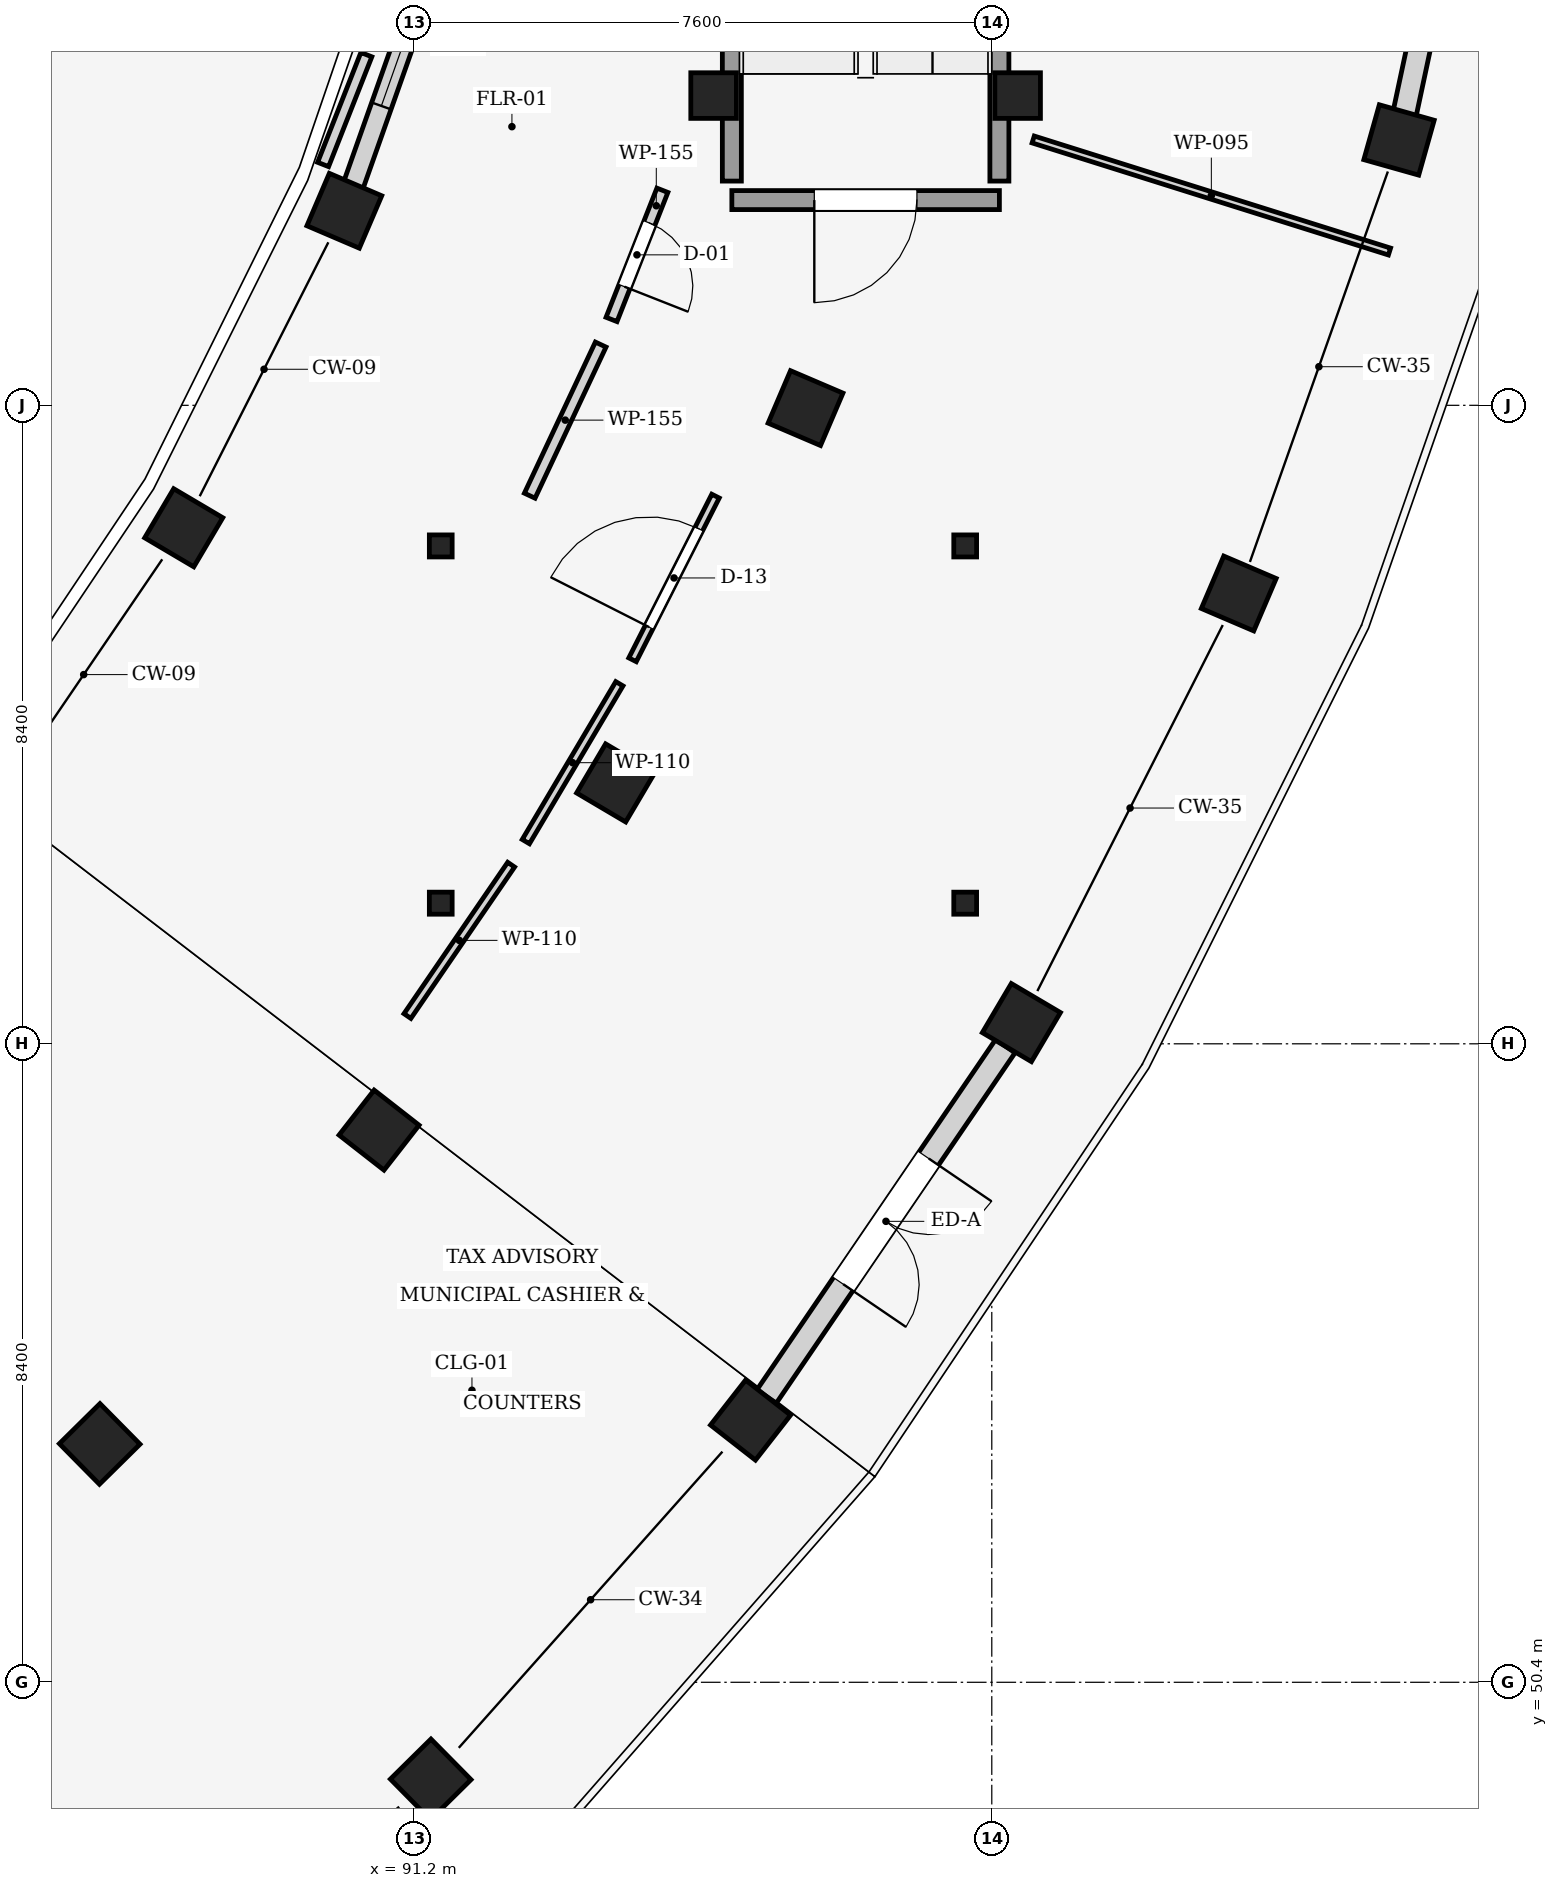
"""IFC4 building model, lengths in metres.
Left out: names, types, materials, properties, quantities, classifications, styles, units other than length and angle.
Written with IfcOpenShell. Run it as: python <this file> out.ifc"""

import sys

from ifc_helpers import new_model, si_unit, direction, frame, frame_2d, origin, origin_2d, place, context, subcontext, project, spatial, rectangle, circle, i_section, extrude, element, fill, save


model = new_model("IFC4")
c1 = context("Model", 3, precision=1e-05, world=origin(), true_north=direction((0.0, 1.0)))
c2 = subcontext(c1, "Body", "Model", "MODEL_VIEW")
j1 = project(units=[si_unit("LENGTHUNIT", "METRE"), si_unit("PLANEANGLEUNIT", "RADIAN")], contexts=[c1])
p1 = place(None, origin())
s1 = spatial("IfcSite", under=j1, at=p1, CompositionType="ELEMENT")
p2 = place(p1, origin())
s2 = spatial("IfcBuilding", under=s1, at=p2, CompositionType="ELEMENT")
p3 = place(p2, origin())
s3 = spatial("IfcBuildingStorey", under=s2, at=p3, CompositionType="ELEMENT", Elevation=0.0)
for number, where, z_axis, x_axis in (
    (1, (87.063, 53.536, 0.0), (0.0, 0.0, 1.0), (0.702, -0.712, 0.0)),
    (2, (91.418, 49.123, 0.0), (0.0, 0.0, 1.0), (0.702, -0.712, 0.0)),
    (3, (90.738, 57.664, 0.0), (0.0, 0.0, 1.0), (0.788, -0.615, 0.0)),
    (4, (95.626, 53.849, 0.0), (0.0, 0.0, 1.0), (0.788, -0.615, 0.0)),
    (5, (88.168, 65.589, 0.0), (0.0, 0.0, 1.0), (0.861, -0.509, 0.0)),
    (6, (93.851, 62.232, 0.0), (0.0, 0.0, 1.0), (0.861, -0.509, 0.0)),
    (7, (99.189, 59.079, 0.0), (0.0, 0.0, 1.0), (0.861, -0.509, 0.0)),
    (8, (90.281, 69.76, 0.0), (0.0, 0.0, 1.0), (0.919, -0.393, 0.0)),
    (9, (96.349, 67.163, 0.0), (0.0, 0.0, 1.0), (0.919, -0.393, 0.0)),
    (10, (102.049, 64.724, 0.0), (0.0, 0.0, 1.0), (0.919, -0.393, 0.0)),
    (11, (104.158, 70.691, 0.0), (0.0, 0.0, 1.0), (0.962, -0.272, 0.0)),
):
    element("IfcColumn", number, at=place(p3, frame(where, z_axis=z_axis, x_axis=x_axis)), inside=s3, PredefinedType="COLUMN", context=c2, shape_type="SweptSolid", body=[
        extrude(circle(Radius=0.375, at=origin_2d()), origin(), (0.0, 0.0, 1.0), 5.1),
    ])
for number, where, z_axis, x_axis in (
    (12, (99.14, 71.275, 0.0), (0.0, 0.0, 1.0), (1.0, 0.0, 0.0)),
    (13, (95.14, 71.275, 0.0), (0.0, 0.0, 1.0), (1.0, 0.0, 0.0)),
):
    element("IfcColumn", number, at=place(p3, frame(where, z_axis=z_axis, x_axis=x_axis)), inside=s3, PredefinedType="COLUMN", context=c2, shape_type="SweptSolid", body=[
        extrude(rectangle(XDim=0.6, YDim=0.6, at=origin_2d()), origin(), (0.0, 0.0, 1.0), 5.1),
    ])
for number, where, z_axis, x_axis in (
    (14, (91.55, 60.65, 0.0), (0.0, 0.0, 1.0), (1.0, 0.0, 0.0)),
    (15, (98.45, 60.65, 0.0), (0.0, 0.0, 1.0), (1.0, 0.0, 0.0)),
    (16, (98.45, 65.35, 0.0), (0.0, 0.0, 1.0), (1.0, 0.0, 0.0)),
    (17, (91.55, 65.35, 0.0), (0.0, 0.0, 1.0), (1.0, 0.0, 0.0)),
):
    element("IfcColumn", number, at=place(p3, frame(where, z_axis=z_axis, x_axis=x_axis)), inside=s3, PredefinedType="COLUMN", context=c2, shape_type="SweptSolid", body=[
        extrude(i_section(OverallWidth=0.3, OverallDepth=0.29, WebThickness=0.009, FlangeThickness=0.014, at=origin_2d()), origin(), (0.0, 0.0, 1.0), 5.1),
    ])
p4 = place(p3, frame((98.978, 58.769, 0.0), z_axis=(0.0, 0.0, 1.0), x_axis=(-0.563145322758, -0.826357879769, 0.0)))
e18 = element("IfcWall", 18, at=p4, inside=s3, PredefinedType="STANDARD", context=c2, shape_type="SweptSolid", body=[
    extrude(rectangle(XDim=5.578, YDim=0.31, at=frame_2d((2.789, 0.0))), origin(), (0.0, 0.0, 1.0), 4.195),
])
p5 = place(p4, frame((1.789, 0.0, 0.0)))
e19 = element("IfcOpeningElement", 19, at=p5, cuts=e18, PredefinedType="OPENING", context=c2, shape_type="SweptSolid", body=[
    extrude(rectangle(XDim=2.0, YDim=2.4, at=frame_2d((1.0, 1.2))), frame((0.0, 0.165, 0.0), z_axis=(0.0, -1.0, 0.0), x_axis=(1.0, 0.0, 0.0)), (0.0, 0.0, 1.0), 0.33),
])
p6 = place(p3, frame((90.391, 70.07, 0.0), z_axis=(0.0, 0.0, 1.0), x_axis=(0.333220558146, 0.942848906044, 0.0)))
e20 = element("IfcWall", 20, at=p6, inside=s3, PredefinedType="STANDARD", context=c2, shape_type="SweptSolid", body=[
    extrude(rectangle(XDim=4.018, YDim=0.27, at=frame_2d((2.009, 0.0))), origin(), (0.0, 0.0, 1.0), 4.195),
])
p7 = place(p6, frame((1.134, 0.0, 0.85)))
e21 = element("IfcOpeningElement", 21, at=p7, cuts=e20, PredefinedType="OPENING", context=c2, shape_type="SweptSolid", body=[
    extrude(rectangle(XDim=1.75, YDim=1.85, at=frame_2d((0.875, 0.925))), frame((0.0, 0.145, 0.0), z_axis=(0.0, -1.0, 0.0), x_axis=(1.0, 0.0, 0.0)), (0.0, 0.0, 1.0), 0.29),
])
p8 = place(p3, frame((105.414, 76.57, 0.0), z_axis=(0.0, 0.0, 1.0), x_axis=(-0.208920042606, -0.977932725599, 0.0)))
e22 = element("IfcWall", 22, at=p8, inside=s3, PredefinedType="STANDARD", context=c2, shape_type="SweptSolid", body=[
    extrude(rectangle(XDim=5.695, YDim=0.31, at=frame_2d((2.847, 0.0))), origin(), (0.0, 0.0, 1.0), 2.45),
])
p9 = place(p8, frame((2.297, 0.0, 0.85)))
e23 = element("IfcOpeningElement", 23, at=p9, cuts=e22, PredefinedType="OPENING", context=c2, shape_type="SweptSolid", body=[
    extrude(rectangle(XDim=1.1, YDim=1.35, at=frame_2d((0.55, 0.675))), frame((0.0, 0.165, 0.0), z_axis=(0.0, -1.0, 0.0), x_axis=(1.0, 0.0, 0.0)), (0.0, 0.0, 1.0), 0.33),
])
p10 = place(p3, frame((98.9, 69.9, 0.0), z_axis=(0.0, 0.0, 1.0), x_axis=(-1.0, 0.0, 0.0)))
e24 = element("IfcWall", 24, at=p10, inside=s3, PredefinedType="SHEAR", context=c2, shape_type="SweptSolid", body=[
    extrude(rectangle(XDim=3.52, YDim=0.25, at=frame_2d((1.76, 0.0))), origin(), (0.0, 0.0, 1.0), 5.1),
])
p11 = place(p10, frame((1.085, 0.0, 0.0)))
e25 = element("IfcOpeningElement", 25, at=p11, cuts=e24, PredefinedType="OPENING", context=c2, shape_type="SweptSolid", body=[
    extrude(rectangle(XDim=1.35, YDim=2.2, at=frame_2d((0.675, 1.1))), frame((0.0, 0.135, 0.0), z_axis=(0.0, -1.0, 0.0), x_axis=(1.0, 0.0, 0.0)), (0.0, 0.0, 1.0), 0.27),
])
for number, where, z_axis, x_axis in (
    (26, (95.38, 70.15, 0.0), (0.0, 0.0, 1.0), (0.0, 1.0, 0.0)),
    (27, (98.9, 77.85, 0.0), (0.0, 0.0, 1.0), (0.0, -1.0, 0.0)),
):
    element("IfcWall", number, at=place(p3, frame(where, z_axis=z_axis, x_axis=x_axis)), inside=s3, PredefinedType="SHEAR", context=c2, shape_type="SweptSolid", body=[
        extrude(rectangle(XDim=7.7, YDim=0.25, at=frame_2d((3.85, 0.0))), origin(), (0.0, 0.0, 1.0), 5.1),
    ])
p12 = place(p3, frame((92.67, 61.46, 0.0), z_axis=(0.0, 0.0, 1.0), x_axis=(0.509713677452, 0.860344098032, 0.0)))
e28 = element("IfcWall", 28, at=p12, inside=s3, PredefinedType="PARTITIONING", context=c2, shape_type="SweptSolid", body=[
    extrude(rectangle(XDim=2.414, YDim=0.11, at=frame_2d((1.207, 0.0))), origin(), (0.0, 0.0, 1.0), 4.045),
])
p13 = place(p3, frame((91.112, 59.165, 0.0), z_axis=(0.0, 0.0, 1.0), x_axis=(0.565227616855, 0.824934992072, 0.0)))
e29 = element("IfcWall", 29, at=p13, inside=s3, PredefinedType="PARTITIONING", context=c2, shape_type="SweptSolid", body=[
    extrude(rectangle(XDim=2.414, YDim=0.11, at=frame_2d((1.207, 0.0))), origin(), (0.0, 0.0, 1.0), 4.73),
])
p14 = place(p3, frame((94.073, 63.852, 0.0), z_axis=(0.0, 0.0, 1.0), x_axis=(0.452141818512, 0.891946061123, 0.0)))
e30 = element("IfcWall", 30, at=p14, inside=s3, PredefinedType="PARTITIONING", context=c2, shape_type="SweptSolid", body=[
    extrude(rectangle(XDim=2.414, YDim=0.11, at=frame_2d((1.207, 0.0))), origin(), (0.0, 0.0, 1.0), 4.73),
])
p15 = place(p14, frame((0.482, 0.0, 0.0)))
e31 = element("IfcOpeningElement", 31, at=p15, cuts=e30, PredefinedType="OPENING", context=c2, shape_type="SweptSolid", body=[
    extrude(rectangle(XDim=1.45, YDim=2.22, at=frame_2d((0.725, 1.11))), frame((0.0, 0.065, 0.0), z_axis=(0.0, -1.0, 0.0), x_axis=(1.0, 0.0, 0.0)), (0.0, 0.0, 1.0), 0.13),
])
p16 = place(p3, frame((104.033, 69.223, 0.0), z_axis=(0.0, 0.0, 1.0), x_axis=(-0.953949858631, 0.299966110114, 0.0)))
e32 = element("IfcWall", 32, at=p16, inside=s3, PredefinedType="PARTITIONING", context=c2, shape_type="SweptSolid", body=[
    extrude(rectangle(XDim=4.914, YDim=0.095, at=frame_2d((2.457, 0.0))), origin(), (0.0, 0.0, 1.0), 4.195),
])
p17 = place(p3, frame((94.466, 70.029, 0.0), z_axis=(0.0, 0.0, 1.0), x_axis=(-0.366384258343, -0.93046363456, 0.0)))
e33 = element("IfcWall", 33, at=p17, inside=s3, PredefinedType="PARTITIONING", context=c2, shape_type="SweptSolid", body=[
    extrude(rectangle(XDim=1.826, YDim=0.155, at=frame_2d((0.913, 0.0))), origin(), (0.0, 0.0, 1.0), 4.73),
])
p18 = place(p17, frame((0.463, 0.0, 0.0)))
e34 = element("IfcOpeningElement", 34, at=p18, cuts=e33, PredefinedType="OPENING", context=c2, shape_type="SweptSolid", body=[
    extrude(rectangle(XDim=0.9, YDim=2.1, at=frame_2d((0.45, 1.05))), frame((0.0, 0.087, 0.0), z_axis=(0.0, -1.0, 0.0), x_axis=(1.0, 0.0, 0.0)), (0.0, 0.0, 1.0), 0.175),
])
p19 = place(p3, frame((93.654, 67.999, 0.0), z_axis=(0.0, 0.0, 1.0), x_axis=(-0.425026094766, -0.905181097222, 0.0)))
e35 = element("IfcWall", 35, at=p19, inside=s3, PredefinedType="PARTITIONING", context=c2, shape_type="SweptSolid", body=[
    extrude(rectangle(XDim=2.197, YDim=0.155, at=frame_2d((1.098, 0.0))), origin(), (0.0, 0.0, 1.0), 4.73),
])
p20 = place(p3, frame((90.002, 70.368, 0.0), z_axis=(0.0, 0.0, 1.0), x_axis=(0.366425549854, 0.930447374339, 0.0)))
e36 = element("IfcWall", 36, at=p20, inside=s3, PredefinedType="PARTITIONING", context=c2, shape_type="SweptSolid", body=[
    extrude(rectangle(XDim=1.553, YDim=0.155, at=frame_2d((0.776, 0.0))), origin(), (0.0, 0.0, 1.0), 4.195),
])
p21 = place(p5, origin())
e37 = element("IfcDoor", 37, at=p21, inside=s3, OperationType="DOUBLE_DOOR_SINGLE_SWING", PredefinedType="DOOR", context=c2, shape_type="SweptSolid", body=[
    extrude(rectangle(XDim=2.0, YDim=2.4, at=frame_2d((1.0, 1.2))), frame((0.0, 0.025, 0.0), z_axis=(0.0, -1.0, 0.0), x_axis=(1.0, 0.0, 0.0)), (0.0, 0.0, 1.0), 0.05),
])
fill(e19, e37)
p22 = place(p7, origin())
e38 = element("IfcWindow", 38, at=p22, inside=s3, PartitioningType="SINGLE_PANEL", PredefinedType="WINDOW", context=c2, shape_type="SweptSolid", body=[
    extrude(rectangle(XDim=1.75, YDim=1.85, at=frame_2d((0.875, 0.925))), frame((0.0, 0.03, 0.0), z_axis=(0.0, -1.0, 0.0), x_axis=(1.0, 0.0, 0.0)), (0.0, 0.0, 1.0), 0.06),
])
fill(e21, e38)
p23 = place(p11, origin())
e39 = element("IfcDoor", 39, at=p23, inside=s3, OperationType="SINGLE_SWING_RIGHT", PredefinedType="DOOR", context=c2, shape_type="SweptSolid", body=[
    extrude(rectangle(XDim=1.35, YDim=2.2, at=frame_2d((0.675, 1.1))), frame((0.0, 0.025, 0.0), z_axis=(0.0, -1.0, 0.0), x_axis=(1.0, 0.0, 0.0)), (0.0, 0.0, 1.0), 0.05),
])
fill(e25, e39)
p24 = place(p15, origin())
e40 = element("IfcDoor", 40, at=p24, inside=s3, OperationType="SINGLE_SWING_LEFT", PredefinedType="DOOR", context=c2, shape_type="SweptSolid", body=[
    extrude(rectangle(XDim=1.45, YDim=2.22, at=frame_2d((0.725, 1.11))), frame((0.0, 0.025, 0.0), z_axis=(0.0, -1.0, 0.0), x_axis=(1.0, 0.0, 0.0)), (0.0, 0.0, 1.0), 0.05),
])
fill(e31, e40)
p25 = place(p18, origin())
e41 = element("IfcDoor", 41, at=p25, inside=s3, OperationType="SINGLE_SWING_RIGHT", PredefinedType="DOOR", context=c2, shape_type="SweptSolid", body=[
    extrude(rectangle(XDim=0.9, YDim=2.1, at=frame_2d((0.45, 1.05))), frame((0.0, 0.025, 0.0), z_axis=(0.0, -1.0, 0.0), x_axis=(1.0, 0.0, 0.0)), (0.0, 0.0, 1.0), 0.05),
])
fill(e34, e41)
save(model, sys.argv[1])
